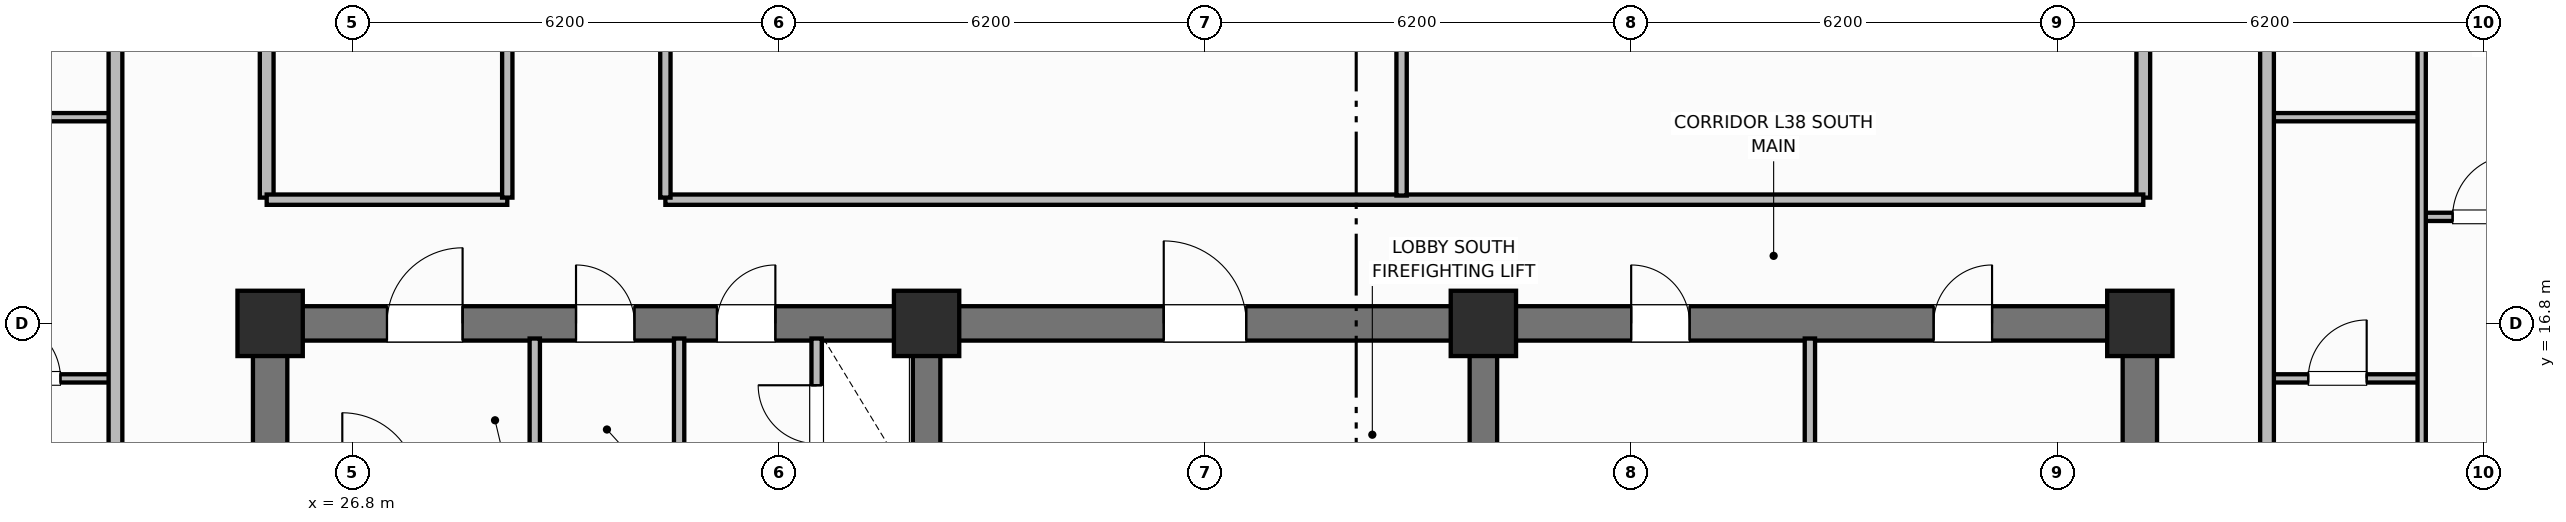
"""IFC4 building model, lengths in metres.
Left out: names, types, materials, properties, quantities, classifications, styles, units other than length and angle.
Written with IfcOpenShell. Run it as: python <this file> out.ifc"""

import sys

from ifc_helpers import new_model, si_unit, direction, frame, frame_2d, origin, origin_2d, place, context, subcontext, project, spatial, rectangle, extrude, element, fill, save


model = new_model("IFC4")
c1 = context("Model", 3, precision=1e-05, world=origin(), true_north=direction((0.0, 1.0)))
c2 = subcontext(c1, "Body", "Model", "MODEL_VIEW")
j1 = project(units=[si_unit("LENGTHUNIT", "METRE"), si_unit("PLANEANGLEUNIT", "RADIAN")], contexts=[c1])
p1 = place(None, origin())
s1 = spatial("IfcSite", under=j1, at=p1, CompositionType="ELEMENT")
p2 = place(p1, origin())
s2 = spatial("IfcBuilding", under=s1, at=p2, CompositionType="ELEMENT")
p3 = place(p2, frame((0.0, 0.0, 155.2)))
s3 = spatial("IfcBuildingStorey", under=s2, at=p3, CompositionType="ELEMENT", Elevation=155.2)
for number, where, z_axis, x_axis in (
    (1, (25.6, 10.85, 0.0), (0.0, 0.0, 1.0), (0.0, 1.0, 0.0)),
    (2, (52.8, 10.85, 0.0), (0.0, 0.0, 1.0), (0.0, 1.0, 0.0)),
):
    element("IfcWall", number, at=place(p3, frame(where, z_axis=z_axis, x_axis=x_axis)), inside=s3, PredefinedType="SHEAR", context=c2, shape_type="SweptSolid", body=[
        extrude(rectangle(XDim=5.7, YDim=0.5, at=frame_2d((2.85, 0.0))), origin(), (0.0, 0.0, 1.0), 3.7),
    ])
p4 = place(p3, frame((25.6, 16.8, 0.0), z_axis=(0.0, 0.0, 1.0), x_axis=(1.0, 0.0, 0.0)))
e3 = element("IfcWall", 3, at=p4, inside=s3, PredefinedType="SHEAR", context=c2, shape_type="SweptSolid", body=[
    extrude(rectangle(XDim=27.2, YDim=0.5, at=frame_2d((13.6, 0.0))), origin(), (0.0, 0.0, 1.0), 3.7),
])
p5 = place(p4, frame((1.7, 0.0, 0.0)))
e4 = element("IfcOpeningElement", 4, at=p5, cuts=e3, PredefinedType="OPENING", context=c2, shape_type="SweptSolid", body=[
    extrude(rectangle(XDim=1.1, YDim=2.15, at=frame_2d((0.55, 1.075))), frame((0.0, 0.26, 0.0), z_axis=(0.0, -1.0, 0.0), x_axis=(1.0, 0.0, 0.0)), (0.0, 0.0, 1.0), 0.52),
])
p6 = place(p4, frame((4.45, 0.0, 0.0)))
e5 = element("IfcOpeningElement", 5, at=p6, cuts=e3, PredefinedType="OPENING", context=c2, shape_type="SweptSolid", body=[
    extrude(rectangle(XDim=0.85, YDim=2.1, at=frame_2d((0.425, 1.05))), frame((0.0, 0.26, 0.0), z_axis=(0.0, -1.0, 0.0), x_axis=(1.0, 0.0, 0.0)), (0.0, 0.0, 1.0), 0.52),
])
p7 = place(p4, frame((6.5, 0.0, 0.0)))
e6 = element("IfcOpeningElement", 6, at=p7, cuts=e3, PredefinedType="OPENING", context=c2, shape_type="SweptSolid", body=[
    extrude(rectangle(XDim=0.85, YDim=2.1, at=frame_2d((0.425, 1.05))), frame((0.0, 0.26, 0.0), z_axis=(0.0, -1.0, 0.0), x_axis=(1.0, 0.0, 0.0)), (0.0, 0.0, 1.0), 0.52),
])
p8 = place(p4, frame((13.0, 0.0, 0.0)))
e7 = element("IfcOpeningElement", 7, at=p8, cuts=e3, PredefinedType="OPENING", context=c2, shape_type="SweptSolid", body=[
    extrude(rectangle(XDim=1.2, YDim=2.15, at=frame_2d((0.6, 1.075))), frame((0.0, 0.26, 0.0), z_axis=(0.0, -1.0, 0.0), x_axis=(1.0, 0.0, 0.0)), (0.0, 0.0, 1.0), 0.52),
])
p9 = place(p4, frame((19.8, 0.0, 0.0)))
e8 = element("IfcOpeningElement", 8, at=p9, cuts=e3, PredefinedType="OPENING", context=c2, shape_type="SweptSolid", body=[
    extrude(rectangle(XDim=0.85, YDim=2.1, at=frame_2d((0.425, 1.05))), frame((0.0, 0.26, 0.0), z_axis=(0.0, -1.0, 0.0), x_axis=(1.0, 0.0, 0.0)), (0.0, 0.0, 1.0), 0.52),
])
p10 = place(p4, frame((24.2, 0.0, 0.0)))
e9 = element("IfcOpeningElement", 9, at=p10, cuts=e3, PredefinedType="OPENING", context=c2, shape_type="SweptSolid", body=[
    extrude(rectangle(XDim=0.85, YDim=2.1, at=frame_2d((0.425, 1.05))), frame((0.0, 0.26, 0.0), z_axis=(0.0, -1.0, 0.0), x_axis=(1.0, 0.0, 0.0)), (0.0, 0.0, 1.0), 0.52),
])
for number, where, z_axis, x_axis in (
    (10, (35.15, 10.85, 0.0), (0.0, 0.0, 1.0), (0.0, 1.0, 0.0)),
    (11, (43.25, 10.85, 0.0), (0.0, 0.0, 1.0), (0.0, 1.0, 0.0)),
):
    element("IfcWall", number, at=place(p3, frame(where, z_axis=z_axis, x_axis=x_axis)), inside=s3, PredefinedType="SHEAR", context=c2, shape_type="SweptSolid", body=[
        extrude(rectangle(XDim=5.7, YDim=0.4, at=frame_2d((2.85, 0.0))), origin(), (0.0, 0.0, 1.0), 3.7),
    ])
for number, where, z_axis, x_axis in (
    (12, (25.6, 16.8, 0.0), (0.0, 0.0, 1.0), (1.0, 0.0, 0.0)),
    (13, (35.15, 16.8, 0.0), (0.0, 0.0, 1.0), (1.0, 0.0, 0.0)),
    (14, (43.25, 16.8, 0.0), (0.0, 0.0, 1.0), (1.0, 0.0, 0.0)),
    (15, (52.8, 16.8, 0.0), (0.0, 0.0, 1.0), (1.0, 0.0, 0.0)),
):
    element("IfcColumn", number, at=place(p3, frame(where, z_axis=z_axis, x_axis=x_axis)), inside=s3, PredefinedType="COLUMN", context=c2, shape_type="SweptSolid", body=[
        extrude(rectangle(XDim=0.95, YDim=0.95, at=origin_2d()), origin(), (0.0, 0.0, 1.0), 3.7),
    ])
for number, where, z_axis, x_axis in (
    (16, (29.45, 14.5, 0.0), (0.0, 0.0, 1.0), (0.0, 1.0, 0.0)),
    (17, (31.55, 14.5, 0.0), (0.0, 0.0, 1.0), (0.0, 1.0, 0.0)),
):
    element("IfcWall", number, at=place(p3, frame(where, z_axis=z_axis, x_axis=x_axis)), inside=s3, PredefinedType="PARTITIONING", context=c2, shape_type="SweptSolid", body=[
        extrude(rectangle(XDim=2.08, YDim=0.15, at=frame_2d((1.04, 0.0))), origin(), (0.0, 0.0, 1.0), 2.55),
    ])
p11 = place(p3, frame((33.55, 14.5, 0.0), z_axis=(0.0, 0.0, 1.0), x_axis=(0.0, 1.0, 0.0)))
e18 = element("IfcWall", 18, at=p11, inside=s3, PredefinedType="PARTITIONING", context=c2, shape_type="SweptSolid", body=[
    extrude(rectangle(XDim=2.08, YDim=0.15, at=frame_2d((1.04, 0.0))), origin(), (0.0, 0.0, 1.0), 2.55),
])
p12 = place(p11, frame((0.55, 0.0, 0.0)))
e19 = element("IfcOpeningElement", 19, at=p12, cuts=e18, PredefinedType="OPENING", context=c2, shape_type="SweptSolid", body=[
    extrude(rectangle(XDim=0.85, YDim=2.05, at=frame_2d((0.425, 1.025))), frame((0.0, 0.085, 0.0), z_axis=(0.0, -1.0, 0.0), x_axis=(1.0, 0.0, 0.0)), (0.0, 0.0, 1.0), 0.17),
])
p13 = place(p3, frame((48.0, 10.95, 0.0), z_axis=(0.0, 0.0, 1.0), x_axis=(0.0, 1.0, 0.0)))
e20 = element("IfcWall", 20, at=p13, inside=s3, PredefinedType="PARTITIONING", context=c2, shape_type="SweptSolid", body=[
    extrude(rectangle(XDim=5.63, YDim=0.15, at=frame_2d((2.815, 0.0))), origin(), (0.0, 0.0, 1.0), 2.55),
])
for number, where, z_axis, x_axis in (
    (21, (25.55, 18.63, 0.0), (0.0, 0.0, 1.0), (0.0, 1.0, 0.0)),
    (22, (52.85, 18.63, 0.0), (0.0, 0.0, 1.0), (0.0, 1.0, 0.0)),
):
    element("IfcWall", number, at=place(p3, frame(where, z_axis=z_axis, x_axis=x_axis)), inside=s3, PredefinedType="PARTITIONING", context=c2, shape_type="SweptSolid", body=[
        extrude(rectangle(XDim=19.14, YDim=0.2, at=frame_2d((9.57, 0.0))), origin(), (0.0, 0.0, 1.0), 2.55),
    ])
p14 = place(p3, frame((25.55, 18.6, 0.0), z_axis=(0.0, 0.0, 1.0), x_axis=(1.0, 0.0, 0.0)))
e23 = element("IfcWall", 23, at=p14, inside=s3, PredefinedType="PARTITIONING", context=c2, shape_type="SweptSolid", body=[
    extrude(rectangle(XDim=3.5, YDim=0.15, at=frame_2d((1.75, 0.0))), origin(), (0.0, 0.0, 1.0), 2.55),
])
p15 = place(p3, frame((31.35, 18.6, 0.0), z_axis=(0.0, 0.0, 1.0), x_axis=(1.0, 0.0, 0.0)))
e24 = element("IfcWall", 24, at=p15, inside=s3, PredefinedType="PARTITIONING", context=c2, shape_type="SweptSolid", body=[
    extrude(rectangle(XDim=21.5, YDim=0.15, at=frame_2d((10.75, 0.0))), origin(), (0.0, 0.0, 1.0), 2.55),
])
p16 = place(p3, frame((42.06, 18.66, 0.0), z_axis=(0.0, 0.0, 1.0), x_axis=(0.0, 1.0, 0.0)))
e25 = element("IfcWall", 25, at=p16, inside=s3, PredefinedType="PARTITIONING", context=c2, shape_type="SweptSolid", body=[
    extrude(rectangle(XDim=19.08, YDim=0.15, at=frame_2d((9.54, 0.0))), origin(), (0.0, 0.0, 1.0), 2.55),
])
p17 = place(p16, frame((6.5, 0.0, 0.0)))
e26 = element("IfcOpeningElement", 26, at=p17, cuts=e25, PredefinedType="OPENING", context=c2, shape_type="SweptSolid", body=[
    extrude(rectangle(XDim=1.0, YDim=2.15, at=frame_2d((0.5, 1.075))), frame((0.0, 0.085, 0.0), z_axis=(0.0, -1.0, 0.0), x_axis=(1.0, 0.0, 0.0)), (0.0, 0.0, 1.0), 0.17),
])
p18 = place(p3, frame((29.05, 18.63, 0.0), z_axis=(0.0, 0.0, 1.0), x_axis=(0.0, 1.0, 0.0)))
e27 = element("IfcWall", 27, at=p18, inside=s3, PredefinedType="PARTITIONING", context=c2, shape_type="SweptSolid", body=[
    extrude(rectangle(XDim=19.14, YDim=0.15, at=frame_2d((9.57, 0.0))), origin(), (0.0, 0.0, 1.0), 2.55),
])
p19 = place(p18, frame((5.5, 0.0, 0.0)))
e28 = element("IfcOpeningElement", 28, at=p19, cuts=e27, PredefinedType="OPENING", context=c2, shape_type="SweptSolid", body=[
    extrude(rectangle(XDim=1.0, YDim=2.15, at=frame_2d((0.5, 1.075))), frame((0.0, 0.085, 0.0), z_axis=(0.0, -1.0, 0.0), x_axis=(1.0, 0.0, 0.0)), (0.0, 0.0, 1.0), 0.17),
])
p20 = place(p3, frame((31.35, 18.63, 0.0), z_axis=(0.0, 0.0, 1.0), x_axis=(0.0, 1.0, 0.0)))
e29 = element("IfcWall", 29, at=p20, inside=s3, PredefinedType="PARTITIONING", context=c2, shape_type="SweptSolid", body=[
    extrude(rectangle(XDim=19.14, YDim=0.15, at=frame_2d((9.57, 0.0))), origin(), (0.0, 0.0, 1.0), 2.55),
])
p21 = place(p20, frame((5.5, 0.0, 0.0)))
e30 = element("IfcOpeningElement", 30, at=p21, cuts=e29, PredefinedType="OPENING", context=c2, shape_type="SweptSolid", body=[
    extrude(rectangle(XDim=1.0, YDim=2.15, at=frame_2d((0.5, 1.075))), frame((0.0, 0.085, 0.0), z_axis=(0.0, -1.0, 0.0), x_axis=(1.0, 0.0, 0.0)), (0.0, 0.0, 1.0), 0.17),
])
p22 = place(p3, frame((21.1, 16.0, 0.0), z_axis=(0.0, 0.0, 1.0), x_axis=(1.0, 0.0, 0.0)))
e31 = element("IfcWall", 31, at=p22, inside=s3, PredefinedType="PARTITIONING", context=c2, shape_type="SweptSolid", body=[
    extrude(rectangle(XDim=2.25, YDim=0.12, at=frame_2d((1.125, 0.0))), origin(), (0.0, 0.0, 1.0), 2.55),
])
p23 = place(p22, frame((0.6, 0.0, 0.0)))
e32 = element("IfcOpeningElement", 32, at=p23, cuts=e31, PredefinedType="OPENING", context=c2, shape_type="SweptSolid", body=[
    extrude(rectangle(XDim=0.85, YDim=2.1, at=frame_2d((0.425, 1.05))), frame((0.0, 0.07, 0.0), z_axis=(0.0, -1.0, 0.0), x_axis=(1.0, 0.0, 0.0)), (0.0, 0.0, 1.0), 0.14),
])
p24 = place(p3, frame((21.1, 19.8, 0.0), z_axis=(0.0, 0.0, 1.0), x_axis=(1.0, 0.0, 0.0)))
e33 = element("IfcWall", 33, at=p24, inside=s3, PredefinedType="PARTITIONING", context=c2, shape_type="SweptSolid", body=[
    extrude(rectangle(XDim=2.25, YDim=0.12, at=frame_2d((1.125, 0.0))), origin(), (0.0, 0.0, 1.0), 2.55),
])
p25 = place(p3, frame((23.35, 10.6, 0.0), z_axis=(0.0, 0.0, 1.0), x_axis=(0.0, 1.0, 0.0)))
e34 = element("IfcWall", 34, at=p25, inside=s3, PredefinedType="PARTITIONING", context=c2, shape_type="SweptSolid", body=[
    extrude(rectangle(XDim=35.2, YDim=0.2, at=frame_2d((17.6, 0.0))), origin(), (0.0, 0.0, 1.0), 2.55),
])
p26 = place(p25, frame((2.65, 0.0, 0.0)))
e35 = element("IfcOpeningElement", 35, at=p26, cuts=e34, PredefinedType="OPENING", context=c2, shape_type="SweptSolid", body=[
    extrude(rectangle(XDim=1.0, YDim=2.15, at=frame_2d((0.5, 1.075))), frame((0.0, 0.11, 0.0), z_axis=(0.0, -1.0, 0.0), x_axis=(1.0, 0.0, 0.0)), (0.0, 0.0, 1.0), 0.22),
])
p27 = place(p25, frame((12.65, 0.0, 0.0)))
e36 = element("IfcOpeningElement", 36, at=p27, cuts=e34, PredefinedType="OPENING", context=c2, shape_type="SweptSolid", body=[
    extrude(rectangle(XDim=1.0, YDim=2.15, at=frame_2d((0.5, 1.075))), frame((0.0, 0.11, 0.0), z_axis=(0.0, -1.0, 0.0), x_axis=(1.0, 0.0, 0.0)), (0.0, 0.0, 1.0), 0.22),
])
p28 = place(p25, frame((23.782, 0.0, 0.0)))
e37 = element("IfcOpeningElement", 37, at=p28, cuts=e34, PredefinedType="OPENING", context=c2, shape_type="SweptSolid", body=[
    extrude(rectangle(XDim=1.0, YDim=2.15, at=frame_2d((0.5, 1.075))), frame((0.0, 0.11, 0.0), z_axis=(0.0, -1.0, 0.0), x_axis=(1.0, 0.0, 0.0)), (0.0, 0.0, 1.0), 0.22),
])
p29 = place(p3, frame((54.65, 16.0, 0.0), z_axis=(0.0, 0.0, 1.0), x_axis=(1.0, 0.0, 0.0)))
e38 = element("IfcWall", 38, at=p29, inside=s3, PredefinedType="PARTITIONING", context=c2, shape_type="SweptSolid", body=[
    extrude(rectangle(XDim=2.25, YDim=0.12, at=frame_2d((1.125, 0.0))), origin(), (0.0, 0.0, 1.0), 2.55),
])
p30 = place(p29, frame((0.6, 0.0, 0.0)))
e39 = element("IfcOpeningElement", 39, at=p30, cuts=e38, PredefinedType="OPENING", context=c2, shape_type="SweptSolid", body=[
    extrude(rectangle(XDim=0.85, YDim=2.1, at=frame_2d((0.425, 1.05))), frame((0.0, 0.07, 0.0), z_axis=(0.0, -1.0, 0.0), x_axis=(1.0, 0.0, 0.0)), (0.0, 0.0, 1.0), 0.14),
])
p31 = place(p3, frame((54.65, 19.8, 0.0), z_axis=(0.0, 0.0, 1.0), x_axis=(1.0, 0.0, 0.0)))
e40 = element("IfcWall", 40, at=p31, inside=s3, PredefinedType="PARTITIONING", context=c2, shape_type="SweptSolid", body=[
    extrude(rectangle(XDim=2.25, YDim=0.12, at=frame_2d((1.125, 0.0))), origin(), (0.0, 0.0, 1.0), 2.55),
])
p32 = place(p3, frame((56.9, 18.35, 0.0), z_axis=(0.0, 0.0, 1.0), x_axis=(1.0, 0.0, 0.0)))
e41 = element("IfcWall", 41, at=p32, inside=s3, PredefinedType="PARTITIONING", context=c2, shape_type="SweptSolid", body=[
    extrude(rectangle(XDim=4.93, YDim=0.12, at=frame_2d((2.465, 0.0))), origin(), (0.0, 0.0, 1.0), 2.55),
])
p33 = place(p32, frame((0.45, 0.0, 0.0)))
e42 = element("IfcOpeningElement", 42, at=p33, cuts=e41, PredefinedType="OPENING", context=c2, shape_type="SweptSolid", body=[
    extrude(rectangle(XDim=0.9, YDim=2.1, at=frame_2d((0.45, 1.05))), frame((0.0, 0.07, 0.0), z_axis=(0.0, -1.0, 0.0), x_axis=(1.0, 0.0, 0.0)), (0.0, 0.0, 1.0), 0.14),
])
p34 = place(p3, frame((56.9, 10.64, 0.0), z_axis=(0.0, 0.0, 1.0), x_axis=(0.0, 1.0, 0.0)))
e43 = element("IfcWall", 43, at=p34, inside=s3, PredefinedType="PARTITIONING", context=c2, shape_type="SweptSolid", body=[
    extrude(rectangle(XDim=19.12, YDim=0.12, at=frame_2d((9.56, 0.0))), origin(), (0.0, 0.0, 1.0), 2.55),
])
p35 = place(p34, frame((0.41, 0.0, 0.0)))
e44 = element("IfcOpeningElement", 44, at=p35, cuts=e43, PredefinedType="OPENING", context=c2, shape_type="SweptSolid", body=[
    extrude(rectangle(XDim=0.9, YDim=2.1, at=frame_2d((0.45, 1.05))), frame((0.0, 0.07, 0.0), z_axis=(0.0, -1.0, 0.0), x_axis=(1.0, 0.0, 0.0)), (0.0, 0.0, 1.0), 0.14),
])
p36 = place(p34, frame((13.735, 0.0, 0.0)))
e45 = element("IfcOpeningElement", 45, at=p36, cuts=e43, PredefinedType="OPENING", context=c2, shape_type="SweptSolid", body=[
    extrude(rectangle(XDim=0.82, YDim=2.08, at=frame_2d((0.41, 1.04))), frame((0.0, 0.07, 0.0), z_axis=(0.0, -1.0, 0.0), x_axis=(1.0, 0.0, 0.0)), (0.0, 0.0, 1.0), 0.14),
])
p37 = place(p3, frame((54.65, 10.6, 0.0), z_axis=(0.0, 0.0, 1.0), x_axis=(0.0, 1.0, 0.0)))
e46 = element("IfcWall", 46, at=p37, inside=s3, PredefinedType="PARTITIONING", context=c2, shape_type="SweptSolid", body=[
    extrude(rectangle(XDim=35.2, YDim=0.2, at=frame_2d((17.6, 0.0))), origin(), (0.0, 0.0, 1.0), 2.55),
])
p38 = place(p37, frame((2.65, 0.0, 0.0)))
e47 = element("IfcOpeningElement", 47, at=p38, cuts=e46, PredefinedType="OPENING", context=c2, shape_type="SweptSolid", body=[
    extrude(rectangle(XDim=1.0, YDim=2.15, at=frame_2d((0.5, 1.075))), frame((0.0, 0.11, 0.0), z_axis=(0.0, -1.0, 0.0), x_axis=(1.0, 0.0, 0.0)), (0.0, 0.0, 1.0), 0.22),
])
p39 = place(p37, frame((22.75, 0.0, 0.0)))
e48 = element("IfcOpeningElement", 48, at=p39, cuts=e46, PredefinedType="OPENING", context=c2, shape_type="SweptSolid", body=[
    extrude(rectangle(XDim=1.0, YDim=2.15, at=frame_2d((0.5, 1.075))), frame((0.0, 0.11, 0.0), z_axis=(0.0, -1.0, 0.0), x_axis=(1.0, 0.0, 0.0)), (0.0, 0.0, 1.0), 0.22),
])
p40 = place(p12, origin())
e49 = element("IfcDoor", 49, at=p40, inside=s3, OperationType="SINGLE_SWING_RIGHT", PredefinedType="TRAPDOOR", context=c2, shape_type="SweptSolid", body=[
    extrude(rectangle(XDim=0.85, YDim=2.05, at=frame_2d((0.425, 1.025))), frame((0.0, 0.025, 0.0), z_axis=(0.0, -1.0, 0.0), x_axis=(1.0, 0.0, 0.0)), (0.0, 0.0, 1.0), 0.05),
])
fill(e19, e49)
p41 = place(p23, origin())
e50 = element("IfcDoor", 50, at=p41, inside=s3, OperationType="SINGLE_SWING_LEFT", PredefinedType="DOOR", context=c2, shape_type="SweptSolid", body=[
    extrude(rectangle(XDim=0.85, YDim=2.1, at=frame_2d((0.425, 1.05))), frame((0.0, 0.025, 0.0), z_axis=(0.0, -1.0, 0.0), x_axis=(1.0, 0.0, 0.0)), (0.0, 0.0, 1.0), 0.05),
])
fill(e32, e50)
p42 = place(p30, origin())
e51 = element("IfcDoor", 51, at=p42, inside=s3, OperationType="SINGLE_SWING_RIGHT", PredefinedType="DOOR", context=c2, shape_type="SweptSolid", body=[
    extrude(rectangle(XDim=0.85, YDim=2.1, at=frame_2d((0.425, 1.05))), frame((0.0, 0.025, 0.0), z_axis=(0.0, -1.0, 0.0), x_axis=(1.0, 0.0, 0.0)), (0.0, 0.0, 1.0), 0.05),
])
fill(e39, e51)
p43 = place(p33, origin())
e52 = element("IfcDoor", 52, at=p43, inside=s3, OperationType="SINGLE_SWING_RIGHT", PredefinedType="DOOR", context=c2, shape_type="SweptSolid", body=[
    extrude(rectangle(XDim=0.9, YDim=2.1, at=frame_2d((0.45, 1.05))), frame((0.0, 0.025, 0.0), z_axis=(0.0, -1.0, 0.0), x_axis=(1.0, 0.0, 0.0)), (0.0, 0.0, 1.0), 0.05),
])
fill(e42, e52)
p44 = place(p5, origin())
e53 = element("IfcDoor", 53, at=p44, inside=s3, OperationType="SINGLE_SWING_RIGHT", PredefinedType="DOOR", context=c2, shape_type="SweptSolid", body=[
    extrude(rectangle(XDim=1.1, YDim=2.15, at=frame_2d((0.55, 1.075))), frame((0.0, 0.025, 0.0), z_axis=(0.0, -1.0, 0.0), x_axis=(1.0, 0.0, 0.0)), (0.0, 0.0, 1.0), 0.05),
])
fill(e4, e53)
p45 = place(p6, origin())
e54 = element("IfcDoor", 54, at=p45, inside=s3, OperationType="SINGLE_SWING_LEFT", PredefinedType="DOOR", context=c2, shape_type="SweptSolid", body=[
    extrude(rectangle(XDim=0.85, YDim=2.1, at=frame_2d((0.425, 1.05))), frame((0.0, 0.025, 0.0), z_axis=(0.0, -1.0, 0.0), x_axis=(1.0, 0.0, 0.0)), (0.0, 0.0, 1.0), 0.05),
])
fill(e5, e54)
p46 = place(p7, origin())
e55 = element("IfcDoor", 55, at=p46, inside=s3, OperationType="SINGLE_SWING_RIGHT", PredefinedType="DOOR", context=c2, shape_type="SweptSolid", body=[
    extrude(rectangle(XDim=0.85, YDim=2.1, at=frame_2d((0.425, 1.05))), frame((0.0, 0.025, 0.0), z_axis=(0.0, -1.0, 0.0), x_axis=(1.0, 0.0, 0.0)), (0.0, 0.0, 1.0), 0.05),
])
fill(e6, e55)
p47 = place(p8, origin())
e56 = element("IfcDoor", 56, at=p47, inside=s3, OperationType="SINGLE_SWING_LEFT", PredefinedType="DOOR", context=c2, shape_type="SweptSolid", body=[
    extrude(rectangle(XDim=1.2, YDim=2.15, at=frame_2d((0.6, 1.075))), frame((0.0, 0.025, 0.0), z_axis=(0.0, -1.0, 0.0), x_axis=(1.0, 0.0, 0.0)), (0.0, 0.0, 1.0), 0.05),
])
fill(e7, e56)
p48 = place(p9, origin())
e57 = element("IfcDoor", 57, at=p48, inside=s3, OperationType="SINGLE_SWING_LEFT", PredefinedType="DOOR", context=c2, shape_type="SweptSolid", body=[
    extrude(rectangle(XDim=0.85, YDim=2.1, at=frame_2d((0.425, 1.05))), frame((0.0, 0.025, 0.0), z_axis=(0.0, -1.0, 0.0), x_axis=(1.0, 0.0, 0.0)), (0.0, 0.0, 1.0), 0.05),
])
fill(e8, e57)
p49 = place(p10, origin())
e58 = element("IfcDoor", 58, at=p49, inside=s3, OperationType="SINGLE_SWING_RIGHT", PredefinedType="DOOR", context=c2, shape_type="SweptSolid", body=[
    extrude(rectangle(XDim=0.85, YDim=2.1, at=frame_2d((0.425, 1.05))), frame((0.0, 0.025, 0.0), z_axis=(0.0, -1.0, 0.0), x_axis=(1.0, 0.0, 0.0)), (0.0, 0.0, 1.0), 0.05),
])
fill(e9, e58)
save(model, sys.argv[1])
